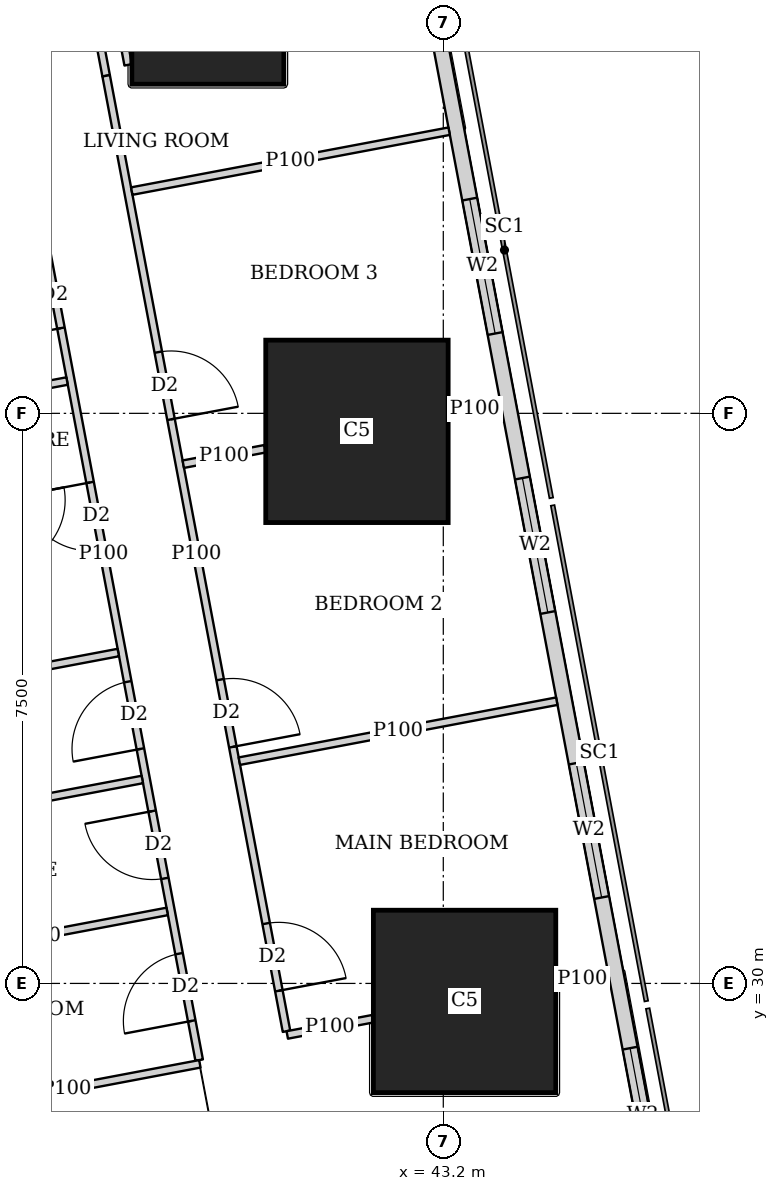
"""IFC4 building model, lengths in metres.
Left out: names, types, materials, properties, quantities, classifications, styles, units other than length and angle.
Written with IfcOpenShell. Run it as: python <this file> out.ifc"""

import sys

from ifc_helpers import new_model, si_unit, direction, frame, frame_2d, origin, origin_2d, place, context, subcontext, project, spatial, rectangle, extrude, element, fill, save


model = new_model("IFC4")
c1 = context("Model", 3, precision=1e-05, world=origin(), true_north=direction((0.0, 1.0)))
c2 = subcontext(c1, "Body", "Model", "MODEL_VIEW")
j1 = project(units=[si_unit("LENGTHUNIT", "METRE"), si_unit("PLANEANGLEUNIT", "RADIAN")], contexts=[c1])
p1 = place(None, origin())
s1 = spatial("IfcSite", under=j1, at=p1, CompositionType="ELEMENT")
p2 = place(p1, origin())
s2 = spatial("IfcBuilding", under=s1, at=p2, CompositionType="ELEMENT")
p3 = place(p2, frame((0.0, 0.0, 223.7)))
s3 = spatial("IfcBuildingStorey", under=s2, at=p3, CompositionType="ELEMENT", Elevation=223.7)
for number, where, z_axis, x_axis in (
    (1, (43.48, 29.763, 0.0), (0.0, 0.0, 1.0), (1.0, 0.0, 0.0)),
    (2, (42.064, 37.263, 0.0), (0.0, 0.0, 1.0), (1.0, 0.0, 0.0)),
):
    element("IfcColumn", number, at=place(p3, frame(where, z_axis=z_axis, x_axis=x_axis)), inside=s3, PredefinedType="COLUMN", context=c2, shape_type="SweptSolid", body=[
        extrude(rectangle(XDim=2.4, YDim=2.4, at=origin_2d()), origin(), (0.0, 0.0, 1.0), 3.75),
    ])
p4 = place(p3, frame((40.102, 42.83, 0.0), z_axis=(0.0, 0.0, 1.0), x_axis=(1.0, 0.0, 0.0)))
e3 = element("IfcColumn", 3, at=p4, inside=s3, PredefinedType="COLUMN", context=c2, shape_type="SweptSolid", body=[
    extrude(rectangle(XDim=2.0, YDim=2.0, at=origin_2d()), origin(), (0.0, 0.0, 1.0), 3.75),
])
p5 = place(p3, frame((50.653, 2.703, 0.0), z_axis=(0.0, 0.0, 1.0), x_axis=(-0.185612026696, 0.982623109613, 0.0)))
e4 = element("IfcWall", 4, at=p5, inside=s3, PredefinedType="SOLIDWALL", context=c2, shape_type="SweptSolid", body=[
    extrude(rectangle(XDim=41.393, YDim=0.2, at=frame_2d((20.697, 0.0))), origin(), (0.0, 0.0, 1.0), 3.5),
])
p6 = place(p5, frame((1.633, 0.0, 0.9)))
e5 = element("IfcOpeningElement", 5, at=p6, cuts=e4, PredefinedType="OPENING", context=c2, shape_type="SweptSolid", body=[
    extrude(rectangle(XDim=1.8, YDim=1.5, at=frame_2d((0.9, 0.75))), frame((0.0, 0.11, 0.0), z_axis=(0.0, -1.0, 0.0), x_axis=(1.0, 0.0, 0.0)), (0.0, 0.0, 1.0), 0.22),
])
p7 = place(p5, frame((6.032, 0.0, 0.9)))
e6 = element("IfcOpeningElement", 6, at=p7, cuts=e4, PredefinedType="OPENING", context=c2, shape_type="SweptSolid", body=[
    extrude(rectangle(XDim=1.8, YDim=1.5, at=frame_2d((0.9, 0.75))), frame((0.0, 0.11, 0.0), z_axis=(0.0, -1.0, 0.0), x_axis=(1.0, 0.0, 0.0)), (0.0, 0.0, 1.0), 0.22),
])
p8 = place(p5, frame((9.848, 0.0, 0.9)))
e7 = element("IfcOpeningElement", 7, at=p8, cuts=e4, PredefinedType="OPENING", context=c2, shape_type="SweptSolid", body=[
    extrude(rectangle(XDim=1.8, YDim=1.5, at=frame_2d((0.9, 0.75))), frame((0.0, 0.11, 0.0), z_axis=(0.0, -1.0, 0.0), x_axis=(1.0, 0.0, 0.0)), (0.0, 0.0, 1.0), 0.22),
])
p9 = place(p5, frame((13.664, 0.0, 0.9)))
e8 = element("IfcOpeningElement", 8, at=p9, cuts=e4, PredefinedType="OPENING", context=c2, shape_type="SweptSolid", body=[
    extrude(rectangle(XDim=1.8, YDim=1.5, at=frame_2d((0.9, 0.75))), frame((0.0, 0.11, 0.0), z_axis=(0.0, -1.0, 0.0), x_axis=(1.0, 0.0, 0.0)), (0.0, 0.0, 1.0), 0.22),
])
p10 = place(p5, frame((17.481, 0.0, 0.9)))
e9 = element("IfcOpeningElement", 9, at=p10, cuts=e4, PredefinedType="OPENING", context=c2, shape_type="SweptSolid", body=[
    extrude(rectangle(XDim=1.8, YDim=1.5, at=frame_2d((0.9, 0.75))), frame((0.0, 0.11, 0.0), z_axis=(0.0, -1.0, 0.0), x_axis=(1.0, 0.0, 0.0)), (0.0, 0.0, 1.0), 0.22),
])
p11 = place(p5, frame((21.297, 0.0, 0.9)))
e10 = element("IfcOpeningElement", 10, at=p11, cuts=e4, PredefinedType="OPENING", context=c2, shape_type="SweptSolid", body=[
    extrude(rectangle(XDim=1.8, YDim=1.5, at=frame_2d((0.9, 0.75))), frame((0.0, 0.11, 0.0), z_axis=(0.0, -1.0, 0.0), x_axis=(1.0, 0.0, 0.0)), (0.0, 0.0, 1.0), 0.22),
])
p12 = place(p5, frame((25.113, 0.0, 0.9)))
e11 = element("IfcOpeningElement", 11, at=p12, cuts=e4, PredefinedType="OPENING", context=c2, shape_type="SweptSolid", body=[
    extrude(rectangle(XDim=1.8, YDim=1.5, at=frame_2d((0.9, 0.75))), frame((0.0, 0.11, 0.0), z_axis=(0.0, -1.0, 0.0), x_axis=(1.0, 0.0, 0.0)), (0.0, 0.0, 1.0), 0.22),
])
p13 = place(p5, frame((28.93, 0.0, 0.9)))
e12 = element("IfcOpeningElement", 12, at=p13, cuts=e4, PredefinedType="OPENING", context=c2, shape_type="SweptSolid", body=[
    extrude(rectangle(XDim=1.8, YDim=1.5, at=frame_2d((0.9, 0.75))), frame((0.0, 0.11, 0.0), z_axis=(0.0, -1.0, 0.0), x_axis=(1.0, 0.0, 0.0)), (0.0, 0.0, 1.0), 0.22),
])
p14 = place(p5, frame((32.746, 0.0, 0.9)))
e13 = element("IfcOpeningElement", 13, at=p14, cuts=e4, PredefinedType="OPENING", context=c2, shape_type="SweptSolid", body=[
    extrude(rectangle(XDim=1.8, YDim=1.5, at=frame_2d((0.9, 0.75))), frame((0.0, 0.11, 0.0), z_axis=(0.0, -1.0, 0.0), x_axis=(1.0, 0.0, 0.0)), (0.0, 0.0, 1.0), 0.22),
])
p15 = place(p5, frame((36.481, 0.0, 0.9)))
e14 = element("IfcOpeningElement", 14, at=p15, cuts=e4, PredefinedType="OPENING", context=c2, shape_type="SweptSolid", body=[
    extrude(rectangle(XDim=1.8, YDim=1.5, at=frame_2d((0.9, 0.75))), frame((0.0, 0.11, 0.0), z_axis=(0.0, -1.0, 0.0), x_axis=(1.0, 0.0, 0.0)), (0.0, 0.0, 1.0), 0.22),
])
p16 = place(p3, frame((33.68, 42.723, 0.0), z_axis=(0.0, 0.0, 1.0), x_axis=(0.185601160014, -0.982625162207, 0.0)))
e15 = element("IfcWall", 15, at=p16, inside=s3, PredefinedType="SOLIDWALL", context=c2, shape_type="SweptSolid", body=[
    extrude(rectangle(XDim=41.051, YDim=0.15, at=frame_2d((20.526, 0.0))), origin(), (0.0, 0.0, 1.0), 2.5),
])
p17 = place(p16, frame((16.123, 0.0, 0.0)))
e16 = element("IfcOpeningElement", 16, at=p17, cuts=e15, PredefinedType="OPENING", context=c2, shape_type="SweptSolid", body=[
    extrude(rectangle(XDim=1.0, YDim=2.1, at=frame_2d((0.5, 1.05))), frame((0.0, 0.085, 0.0), z_axis=(0.0, -1.0, 0.0), x_axis=(1.0, 0.0, 0.0)), (0.0, 0.0, 1.0), 0.17),
])
p18 = place(p16, frame((19.938, 0.0, 0.0)))
e17 = element("IfcOpeningElement", 17, at=p18, cuts=e15, PredefinedType="OPENING", context=c2, shape_type="SweptSolid", body=[
    extrude(rectangle(XDim=1.0, YDim=2.1, at=frame_2d((0.5, 1.05))), frame((0.0, 0.085, 0.0), z_axis=(0.0, -1.0, 0.0), x_axis=(1.0, 0.0, 0.0)), (0.0, 0.0, 1.0), 0.17),
])
p19 = place(p16, frame((30.902, 0.0, 0.0)))
e18 = element("IfcOpeningElement", 18, at=p19, cuts=e15, PredefinedType="OPENING", context=c2, shape_type="SweptSolid", body=[
    extrude(rectangle(XDim=1.0, YDim=2.1, at=frame_2d((0.5, 1.05))), frame((0.0, 0.085, 0.0), z_axis=(0.0, -1.0, 0.0), x_axis=(1.0, 0.0, 0.0)), (0.0, 0.0, 1.0), 0.17),
])
p20 = place(p3, frame((39.054, 42.085, 0.0), z_axis=(0.0, 0.0, 1.0), x_axis=(-0.185791584218, 0.982589175207, 0.0)))
e19 = element("IfcWall", 19, at=p20, inside=s3, PredefinedType="PARTITIONING", context=c2, shape_type="SweptSolid", body=[
    extrude(rectangle(XDim=3.628, YDim=0.1, at=frame_2d((1.814, 0.0))), origin(), (0.0, 0.0, 1.0), 2.05),
])
p21 = place(p3, frame((38.256, 44.628, 0.0), z_axis=(0.0, 0.0, 1.0), x_axis=(0.185700639943, -0.982606366927, 0.0)))
e20 = element("IfcWall", 20, at=p21, inside=s3, PredefinedType="PARTITIONING", context=c2, shape_type="SweptSolid", body=[
    extrude(rectangle(XDim=2.735, YDim=0.1, at=frame_2d((1.367, 0.0))), origin(), (0.0, 0.0, 1.0), 2.05),
])
p22 = place(p3, frame((38.764, 41.941, 0.0), z_axis=(0.0, 0.0, 1.0), x_axis=(0.185512176227, -0.982641965556, 0.0)))
e21 = element("IfcWall", 21, at=p22, inside=s3, PredefinedType="PARTITIONING", context=c2, shape_type="SweptSolid", body=[
    extrude(rectangle(XDim=12.792, YDim=0.1, at=frame_2d((6.396, 0.0))), origin(), (0.0, 0.0, 1.0), 2.5),
])
p23 = place(p22, frame((11.35, 0.0, 0.0)))
e22 = element("IfcOpeningElement", 22, at=p23, cuts=e21, PredefinedType="OPENING", context=c2, shape_type="SweptSolid", body=[
    extrude(rectangle(XDim=0.9, YDim=2.1, at=frame_2d((0.45, 1.05))), frame((0.0, 0.06, 0.0), z_axis=(0.0, -1.0, 0.0), x_axis=(1.0, 0.0, 0.0)), (0.0, 0.0, 1.0), 0.12),
])
p24 = place(p22, frame((8.085, 0.0, 0.0)))
e23 = element("IfcOpeningElement", 23, at=p24, cuts=e21, PredefinedType="OPENING", context=c2, shape_type="SweptSolid", body=[
    extrude(rectangle(XDim=0.9, YDim=2.1, at=frame_2d((0.45, 1.05))), frame((0.0, 0.06, 0.0), z_axis=(0.0, -1.0, 0.0), x_axis=(1.0, 0.0, 0.0)), (0.0, 0.0, 1.0), 0.12),
])
p25 = place(p22, frame((3.7, 0.0, 0.0)))
e24 = element("IfcOpeningElement", 24, at=p25, cuts=e21, PredefinedType="OPENING", context=c2, shape_type="SweptSolid", body=[
    extrude(rectangle(XDim=0.9, YDim=2.1, at=frame_2d((0.45, 1.05))), frame((0.0, 0.06, 0.0), z_axis=(0.0, -1.0, 0.0), x_axis=(1.0, 0.0, 0.0)), (0.0, 0.0, 1.0), 0.12),
])
p26 = place(p3, frame((37.473, 42.309, 0.0), z_axis=(0.0, 0.0, 1.0), x_axis=(0.185570636839, -0.982630927024, 0.0)))
e25 = element("IfcWall", 25, at=p26, inside=s3, PredefinedType="PARTITIONING", context=c2, shape_type="SweptSolid", body=[
    extrude(rectangle(XDim=13.553, YDim=0.1, at=frame_2d((6.777, 0.0))), origin(), (0.0, 0.0, 1.0), 2.5),
])
p27 = place(p26, frame((12.128, 0.0, 0.0)))
e26 = element("IfcOpeningElement", 26, at=p27, cuts=e25, PredefinedType="OPENING", context=c2, shape_type="SweptSolid", body=[
    extrude(rectangle(XDim=0.9, YDim=2.1, at=frame_2d((0.45, 1.05))), frame((0.0, 0.06, 0.0), z_axis=(0.0, -1.0, 0.0), x_axis=(1.0, 0.0, 0.0)), (0.0, 0.0, 1.0), 0.12),
])
p28 = place(p26, frame((8.487, 0.0, 0.0)))
e27 = element("IfcOpeningElement", 27, at=p28, cuts=e25, PredefinedType="OPENING", context=c2, shape_type="SweptSolid", body=[
    extrude(rectangle(XDim=0.9, YDim=2.1, at=frame_2d((0.45, 1.05))), frame((0.0, 0.06, 0.0), z_axis=(0.0, -1.0, 0.0), x_axis=(1.0, 0.0, 0.0)), (0.0, 0.0, 1.0), 0.12),
])
p29 = place(p26, frame((2.853, 0.0, 0.0)))
e28 = element("IfcOpeningElement", 28, at=p29, cuts=e25, PredefinedType="OPENING", context=c2, shape_type="SweptSolid", body=[
    extrude(rectangle(XDim=0.9, YDim=2.1, at=frame_2d((0.45, 1.05))), frame((0.0, 0.06, 0.0), z_axis=(0.0, -1.0, 0.0), x_axis=(1.0, 0.0, 0.0)), (0.0, 0.0, 1.0), 0.12),
])
p30 = place(p26, frame((10.22, 0.0, 0.0)))
e29 = element("IfcOpeningElement", 29, at=p30, cuts=e25, PredefinedType="OPENING", context=c2, shape_type="SweptSolid", body=[
    extrude(rectangle(XDim=0.9, YDim=2.1, at=frame_2d((0.45, 1.05))), frame((0.0, 0.06, 0.0), z_axis=(0.0, -1.0, 0.0), x_axis=(1.0, 0.0, 0.0)), (0.0, 0.0, 1.0), 0.12),
])
p31 = place(p26, frame((5.819, 0.0, 0.0)))
e30 = element("IfcOpeningElement", 30, at=p31, cuts=e25, PredefinedType="OPENING", context=c2, shape_type="SweptSolid", body=[
    extrude(rectangle(XDim=0.9, YDim=2.1, at=frame_2d((0.45, 1.05))), frame((0.0, 0.06, 0.0), z_axis=(0.0, -1.0, 0.0), x_axis=(1.0, 0.0, 0.0)), (0.0, 0.0, 1.0), 0.12),
])
p32 = place(p3, frame((43.277, 41.212, 0.0), z_axis=(0.0, 0.0, 1.0), x_axis=(-0.982665405803, -0.185387972203, 0.0)))
e31 = element("IfcWall", 31, at=p32, inside=s3, PredefinedType="PARTITIONING", context=c2, shape_type="SweptSolid", body=[
    extrude(rectangle(XDim=4.25, YDim=0.1, at=frame_2d((2.125, 0.0))), origin(), (0.0, 0.0, 1.0), 2.05),
])
p33 = place(p3, frame((43.955, 37.62, 0.0), z_axis=(0.0, 0.0, 1.0), x_axis=(-0.982495415327, -0.186286765128, 0.0)))
e32 = element("IfcWall", 32, at=p33, inside=s3, PredefinedType="PARTITIONING", context=c2, shape_type="SweptSolid", body=[
    extrude(rectangle(XDim=0.693, YDim=0.1, at=frame_2d((0.347, 0.0))), origin(), (0.0, 0.0, 1.0), 3.5),
])
p34 = place(p3, frame((40.854, 37.034, 0.0), z_axis=(0.0, 0.0, 1.0), x_axis=(-0.982651678759, -0.185460718839, 0.0)))
e33 = element("IfcWall", 33, at=p34, inside=s3, PredefinedType="PARTITIONING", context=c2, shape_type="SweptSolid", body=[
    extrude(rectangle(XDim=1.094, YDim=0.1, at=frame_2d((0.547, 0.0))), origin(), (0.0, 0.0, 1.0), 3.5),
])
p35 = place(p3, frame((44.693, 33.713, 0.0), z_axis=(0.0, 0.0, 1.0), x_axis=(-0.982623519589, -0.185609856287, 0.0)))
e34 = element("IfcWall", 34, at=p35, inside=s3, PredefinedType="PARTITIONING", context=c2, shape_type="SweptSolid", body=[
    extrude(rectangle(XDim=4.25, YDim=0.1, at=frame_2d((2.125, 0.0))), origin(), (0.0, 0.0, 1.0), 2.05),
])
p36 = place(p3, frame((45.372, 30.121, 0.0), z_axis=(0.0, 0.0, 1.0), x_axis=(-0.98254419619, -0.186029305578, 0.0)))
e35 = element("IfcWall", 35, at=p36, inside=s3, PredefinedType="PARTITIONING", context=c2, shape_type="SweptSolid", body=[
    extrude(rectangle(XDim=0.694, YDim=0.1, at=frame_2d((0.347, 0.0))), origin(), (0.0, 0.0, 1.0), 3.5),
])
p37 = place(p3, frame((42.27, 29.535, 0.0), z_axis=(0.0, 0.0, 1.0), x_axis=(-0.982502700549, -0.186248338017, 0.0)))
e36 = element("IfcWall", 36, at=p37, inside=s3, PredefinedType="PARTITIONING", context=c2, shape_type="SweptSolid", body=[
    extrude(rectangle(XDim=1.143, YDim=0.1, at=frame_2d((0.572, 0.0))), origin(), (0.0, 0.0, 1.0), 2.5),
])
p38 = place(p3, frame((38.25, 37.925, 0.0), z_axis=(0.0, 0.0, 1.0), x_axis=(-0.982610209589, -0.185680305934, 0.0)))
e37 = element("IfcWall", 37, at=p38, inside=s3, PredefinedType="PARTITIONING", context=c2, shape_type="SweptSolid", body=[
    extrude(rectangle(XDim=1.567, YDim=0.1, at=frame_2d((0.784, 0.0))), origin(), (0.0, 0.0, 1.0), 3.5),
])
p39 = place(p3, frame((39.24, 32.683, 0.0), z_axis=(0.0, 0.0, 1.0), x_axis=(-0.982638553676, -0.185530247748, 0.0)))
e38 = element("IfcWall", 38, at=p39, inside=s3, PredefinedType="PARTITIONING", context=c2, shape_type="SweptSolid", body=[
    extrude(rectangle(XDim=3.525, YDim=0.1, at=frame_2d((1.763, 0.0))), origin(), (0.0, 0.0, 1.0), 3.5),
])
p40 = place(p3, frame((39.997, 28.942, 0.0), z_axis=(0.0, 0.0, 1.0), x_axis=(-0.982613029841, -0.185665380691, 0.0)))
e39 = element("IfcWall", 39, at=p40, inside=s3, PredefinedType="PARTITIONING", context=c2, shape_type="SweptSolid", body=[
    extrude(rectangle(XDim=3.575, YDim=0.1, at=frame_2d((1.788, 0.0))), origin(), (0.0, 0.0, 1.0), 3.5),
])
p41 = place(p3, frame((39.567, 30.947, 0.0), z_axis=(0.0, 0.0, 1.0), x_axis=(-0.982576058723, -0.185860939478, 0.0)))
e40 = element("IfcWall", 40, at=p41, inside=s3, PredefinedType="PARTITIONING", context=c2, shape_type="SweptSolid", body=[
    extrude(rectangle(XDim=3.524, YDim=0.1, at=frame_2d((1.762, 0.0))), origin(), (0.0, 0.0, 1.0), 2.5),
])
p42 = place(p3, frame((38.924, 34.353, 0.0), z_axis=(0.0, 0.0, 1.0), x_axis=(-0.982629014545, -0.18558076348, 0.0)))
e41 = element("IfcWall", 41, at=p42, inside=s3, PredefinedType="PARTITIONING", context=c2, shape_type="SweptSolid", body=[
    extrude(rectangle(XDim=3.524, YDim=0.1, at=frame_2d((1.762, 0.0))), origin(), (0.0, 0.0, 1.0), 3.5),
])
p43 = place(p12, origin())
e42 = element("IfcWindow", 42, at=p43, inside=s3, PartitioningType="SINGLE_PANEL", PredefinedType="WINDOW", context=c2, shape_type="SweptSolid", body=[
    extrude(rectangle(XDim=1.8, YDim=1.5, at=frame_2d((0.9, 0.75))), frame((0.0, 0.03, 0.0), z_axis=(0.0, -1.0, 0.0), x_axis=(1.0, 0.0, 0.0)), (0.0, 0.0, 1.0), 0.06),
])
fill(e11, e42)
p44 = place(p13, origin())
e43 = element("IfcWindow", 43, at=p44, inside=s3, PartitioningType="SINGLE_PANEL", PredefinedType="WINDOW", context=c2, shape_type="SweptSolid", body=[
    extrude(rectangle(XDim=1.8, YDim=1.5, at=frame_2d((0.9, 0.75))), frame((0.0, 0.03, 0.0), z_axis=(0.0, -1.0, 0.0), x_axis=(1.0, 0.0, 0.0)), (0.0, 0.0, 1.0), 0.06),
])
fill(e12, e43)
p45 = place(p14, origin())
e44 = element("IfcWindow", 44, at=p45, inside=s3, PartitioningType="SINGLE_PANEL", PredefinedType="WINDOW", context=c2, shape_type="SweptSolid", body=[
    extrude(rectangle(XDim=1.8, YDim=1.5, at=frame_2d((0.9, 0.75))), frame((0.0, 0.03, 0.0), z_axis=(0.0, -1.0, 0.0), x_axis=(1.0, 0.0, 0.0)), (0.0, 0.0, 1.0), 0.06),
])
fill(e13, e44)
p46 = place(p15, origin())
e45 = element("IfcWindow", 45, at=p46, inside=s3, PartitioningType="SINGLE_PANEL", PredefinedType="WINDOW", context=c2, shape_type="SweptSolid", body=[
    extrude(rectangle(XDim=1.8, YDim=1.5, at=frame_2d((0.9, 0.75))), frame((0.0, 0.03, 0.0), z_axis=(0.0, -1.0, 0.0), x_axis=(1.0, 0.0, 0.0)), (0.0, 0.0, 1.0), 0.06),
])
fill(e14, e45)
p47 = place(p23, origin())
e46 = element("IfcDoor", 46, at=p47, inside=s3, OperationType="SINGLE_SWING_RIGHT", PredefinedType="DOOR", context=c2, shape_type="SweptSolid", body=[
    extrude(rectangle(XDim=0.9, YDim=2.1, at=frame_2d((0.45, 1.05))), frame((0.0, 0.025, 0.0), z_axis=(0.0, -1.0, 0.0), x_axis=(1.0, 0.0, 0.0)), (0.0, 0.0, 1.0), 0.05),
])
fill(e22, e46)
p48 = place(p24, origin())
e47 = element("IfcDoor", 47, at=p48, inside=s3, OperationType="SINGLE_SWING_RIGHT", PredefinedType="DOOR", context=c2, shape_type="SweptSolid", body=[
    extrude(rectangle(XDim=0.9, YDim=2.1, at=frame_2d((0.45, 1.05))), frame((0.0, 0.025, 0.0), z_axis=(0.0, -1.0, 0.0), x_axis=(1.0, 0.0, 0.0)), (0.0, 0.0, 1.0), 0.05),
])
fill(e23, e47)
p49 = place(p25, origin())
e48 = element("IfcDoor", 48, at=p49, inside=s3, OperationType="SINGLE_SWING_RIGHT", PredefinedType="DOOR", context=c2, shape_type="SweptSolid", body=[
    extrude(rectangle(XDim=0.9, YDim=2.1, at=frame_2d((0.45, 1.05))), frame((0.0, 0.025, 0.0), z_axis=(0.0, -1.0, 0.0), x_axis=(1.0, 0.0, 0.0)), (0.0, 0.0, 1.0), 0.05),
])
fill(e24, e48)
p50 = place(p27, origin())
e49 = element("IfcDoor", 49, at=p50, inside=s3, OperationType="SINGLE_SWING_LEFT", PredefinedType="DOOR", context=c2, shape_type="SweptSolid", body=[
    extrude(rectangle(XDim=0.9, YDim=2.1, at=frame_2d((0.45, 1.05))), frame((0.0, 0.025, 0.0), z_axis=(0.0, -1.0, 0.0), x_axis=(1.0, 0.0, 0.0)), (0.0, 0.0, 1.0), 0.05),
])
fill(e26, e49)
p51 = place(p28, origin())
e50 = element("IfcDoor", 50, at=p51, inside=s3, OperationType="SINGLE_SWING_LEFT", PredefinedType="DOOR", context=c2, shape_type="SweptSolid", body=[
    extrude(rectangle(XDim=0.9, YDim=2.1, at=frame_2d((0.45, 1.05))), frame((0.0, 0.025, 0.0), z_axis=(0.0, -1.0, 0.0), x_axis=(1.0, 0.0, 0.0)), (0.0, 0.0, 1.0), 0.05),
])
fill(e27, e50)
p52 = place(p29, origin())
e51 = element("IfcDoor", 51, at=p52, inside=s3, OperationType="SINGLE_SWING_LEFT", PredefinedType="DOOR", context=c2, shape_type="SweptSolid", body=[
    extrude(rectangle(XDim=0.9, YDim=2.1, at=frame_2d((0.45, 1.05))), frame((0.0, 0.025, 0.0), z_axis=(0.0, -1.0, 0.0), x_axis=(1.0, 0.0, 0.0)), (0.0, 0.0, 1.0), 0.05),
])
fill(e28, e51)
p53 = place(p30, origin())
e52 = element("IfcDoor", 52, at=p53, inside=s3, OperationType="SINGLE_SWING_RIGHT", PredefinedType="DOOR", context=c2, shape_type="SweptSolid", body=[
    extrude(rectangle(XDim=0.9, YDim=2.1, at=frame_2d((0.45, 1.05))), frame((0.0, 0.025, 0.0), z_axis=(0.0, -1.0, 0.0), x_axis=(1.0, 0.0, 0.0)), (0.0, 0.0, 1.0), 0.05),
])
fill(e29, e52)
p54 = place(p31, origin())
e53 = element("IfcDoor", 53, at=p54, inside=s3, OperationType="SINGLE_SWING_RIGHT", PredefinedType="DOOR", context=c2, shape_type="SweptSolid", body=[
    extrude(rectangle(XDim=0.9, YDim=2.1, at=frame_2d((0.45, 1.05))), frame((0.0, 0.025, 0.0), z_axis=(0.0, -1.0, 0.0), x_axis=(1.0, 0.0, 0.0)), (0.0, 0.0, 1.0), 0.05),
])
fill(e30, e53)
save(model, sys.argv[1])
